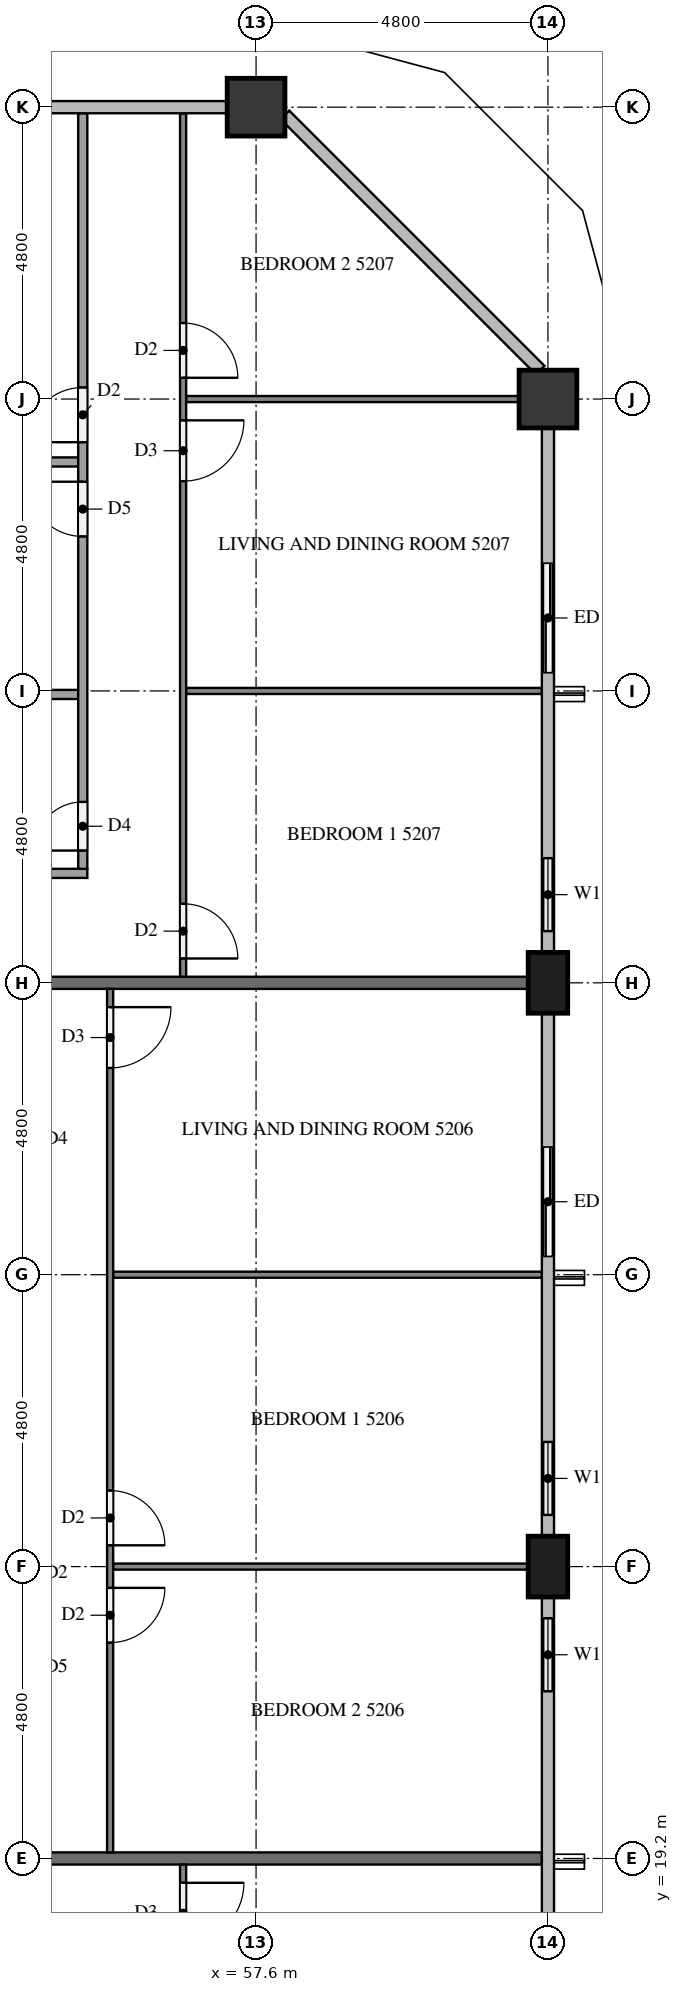
"""IFC4 building model, lengths in metres.
Left out: names, types, materials, properties, quantities, classifications, styles, units other than length and angle.
Written with IfcOpenShell. Run it as: python <this file> out.ifc"""

import sys

from ifc_helpers import new_model, si_unit, direction, frame, frame_2d, origin, origin_2d, place, context, subcontext, project, spatial, rectangle, extrude, element, fill, save


model = new_model("IFC4")
c1 = context("Model", 3, precision=1e-05, world=origin(), true_north=direction((0.0, 1.0)))
c2 = subcontext(c1, "Body", "Model", "MODEL_VIEW")
j1 = project(units=[si_unit("LENGTHUNIT", "METRE"), si_unit("PLANEANGLEUNIT", "RADIAN")], contexts=[c1])
p1 = place(None, origin())
s1 = spatial("IfcSite", under=j1, at=p1, CompositionType="ELEMENT")
p2 = place(p1, origin())
s2 = spatial("IfcBuilding", under=s1, at=p2, CompositionType="ELEMENT")
p3 = place(p2, frame((0.0, 0.0, 199.9)))
s3 = spatial("IfcBuildingStorey", under=s2, at=p3, CompositionType="ELEMENT", Elevation=199.9)
for number, where, z_axis, x_axis in (
    (1, (62.4, 24.0, 0.0), (0.0, 0.0, 1.0), (0.0, 1.0, 0.0)),
    (2, (62.4, 33.6, 0.0), (0.0, 0.0, 1.0), (0.0, 1.0, 0.0)),
):
    element("IfcColumn", number, at=place(p3, frame(where, z_axis=z_axis, x_axis=x_axis)), inside=s3, PredefinedType="COLUMN", context=c2, shape_type="SweptSolid", body=[
        extrude(rectangle(XDim=1.0, YDim=0.65, at=origin_2d()), origin(), (0.0, 0.0, 1.0), 3.1),
    ])
for number, where, z_axis, x_axis in (
    (3, (62.4, 43.2, 0.0), (0.0, 0.0, 1.0), (1.0, 0.0, 0.0)),
    (4, (57.6, 48.0, 0.0), (0.0, 0.0, 1.0), (1.0, 0.0, 0.0)),
):
    element("IfcColumn", number, at=place(p3, frame(where, z_axis=z_axis, x_axis=x_axis)), inside=s3, PredefinedType="COLUMN", context=c2, shape_type="SweptSolid", body=[
        extrude(rectangle(XDim=0.95, YDim=0.95, at=origin_2d()), origin(), (0.0, 0.0, 1.0), 3.1),
    ])
p4 = place(p3, frame((62.4, 21.6, 0.0), z_axis=(0.0, 0.0, 1.0), x_axis=(0.0, 1.0, 0.0)))
e5 = element("IfcWall", 5, at=p4, inside=s3, PredefinedType="SOLIDWALL", context=c2, shape_type="SweptSolid", body=[
    extrude(rectangle(XDim=1.9, YDim=0.15, at=frame_2d((0.95, 0.0))), origin(), (0.0, 0.0, 1.0), 3.1),
])
p5 = place(p4, frame((0.35, 0.0, 0.9)))
e6 = element("IfcOpeningElement", 6, at=p5, cuts=e5, PredefinedType="OPENING", context=c2, shape_type="SweptSolid", body=[
    extrude(rectangle(XDim=1.2, YDim=1.4, at=frame_2d((0.6, 0.7))), frame((0.0, 0.085, 0.0), z_axis=(0.0, -1.0, 0.0), x_axis=(1.0, 0.0, 0.0)), (0.0, 0.0, 1.0), 0.17),
])
p6 = place(p3, frame((62.4, 24.5, 0.0), z_axis=(0.0, 0.0, 1.0), x_axis=(0.0, 1.0, 0.0)))
e7 = element("IfcWall", 7, at=p6, inside=s3, PredefinedType="SOLIDWALL", context=c2, shape_type="SweptSolid", body=[
    extrude(rectangle(XDim=1.9, YDim=0.15, at=frame_2d((0.95, 0.0))), origin(), (0.0, 0.0, 1.0), 3.1),
])
p7 = place(p6, frame((0.35, 0.0, 0.9)))
e8 = element("IfcOpeningElement", 8, at=p7, cuts=e7, PredefinedType="OPENING", context=c2, shape_type="SweptSolid", body=[
    extrude(rectangle(XDim=1.2, YDim=1.4, at=frame_2d((0.6, 0.7))), frame((0.0, 0.085, 0.0), z_axis=(0.0, -1.0, 0.0), x_axis=(1.0, 0.0, 0.0)), (0.0, 0.0, 1.0), 0.17),
])
p8 = place(p3, frame((62.4, 28.8, 0.0), z_axis=(0.0, 0.0, 1.0), x_axis=(0.0, 1.0, 0.0)))
e9 = element("IfcWall", 9, at=p8, inside=s3, PredefinedType="SOLIDWALL", context=c2, shape_type="SweptSolid", body=[
    extrude(rectangle(XDim=2.4, YDim=0.15, at=frame_2d((1.2, 0.0))), origin(), (0.0, 0.0, 1.0), 3.1),
])
p9 = place(p8, frame((0.3, 0.0, 0.0)))
e10 = element("IfcOpeningElement", 10, at=p9, cuts=e9, PredefinedType="OPENING", context=c2, shape_type="SweptSolid", body=[
    extrude(rectangle(XDim=1.8, YDim=2.4, at=frame_2d((0.9, 1.2))), frame((0.0, 0.085, 0.0), z_axis=(0.0, -1.0, 0.0), x_axis=(1.0, 0.0, 0.0)), (0.0, 0.0, 1.0), 0.17),
])
p10 = place(p3, frame((62.4, 34.1, 0.0), z_axis=(0.0, 0.0, 1.0), x_axis=(0.0, 1.0, 0.0)))
e11 = element("IfcWall", 11, at=p10, inside=s3, PredefinedType="SOLIDWALL", context=c2, shape_type="SweptSolid", body=[
    extrude(rectangle(XDim=1.9, YDim=0.15, at=frame_2d((0.95, 0.0))), origin(), (0.0, 0.0, 1.0), 3.1),
])
p11 = place(p10, frame((0.35, 0.0, 0.9)))
e12 = element("IfcOpeningElement", 12, at=p11, cuts=e11, PredefinedType="OPENING", context=c2, shape_type="SweptSolid", body=[
    extrude(rectangle(XDim=1.2, YDim=1.4, at=frame_2d((0.6, 0.7))), frame((0.0, 0.085, 0.0), z_axis=(0.0, -1.0, 0.0), x_axis=(1.0, 0.0, 0.0)), (0.0, 0.0, 1.0), 0.17),
])
p12 = place(p3, frame((62.4, 38.4, 0.0), z_axis=(0.0, 0.0, 1.0), x_axis=(0.0, 1.0, 0.0)))
e13 = element("IfcWall", 13, at=p12, inside=s3, PredefinedType="SOLIDWALL", context=c2, shape_type="SweptSolid", body=[
    extrude(rectangle(XDim=2.4, YDim=0.15, at=frame_2d((1.2, 0.0))), origin(), (0.0, 0.0, 1.0), 3.1),
])
p13 = place(p12, frame((0.3, 0.0, 0.0)))
e14 = element("IfcOpeningElement", 14, at=p13, cuts=e13, PredefinedType="OPENING", context=c2, shape_type="SweptSolid", body=[
    extrude(rectangle(XDim=1.8, YDim=2.4, at=frame_2d((0.9, 1.2))), frame((0.0, 0.085, 0.0), z_axis=(0.0, -1.0, 0.0), x_axis=(1.0, 0.0, 0.0)), (0.0, 0.0, 1.0), 0.17),
])
p14 = place(p3, frame((50.5, 19.2, 0.0), z_axis=(0.0, 0.0, 1.0), x_axis=(1.0, 0.0, 0.0)))
e15 = element("IfcWall", 15, at=p14, inside=s3, PredefinedType="PARTITIONING", context=c2, shape_type="SweptSolid", body=[
    extrude(rectangle(XDim=11.8, YDim=0.2, at=frame_2d((5.9, 0.0))), origin(), (0.0, 0.0, 1.0), 3.1),
])
p15 = place(p3, frame((50.5, 33.6, 0.0), z_axis=(0.0, 0.0, 1.0), x_axis=(1.0, 0.0, 0.0)))
e16 = element("IfcWall", 16, at=p15, inside=s3, PredefinedType="PARTITIONING", context=c2, shape_type="SweptSolid", body=[
    extrude(rectangle(XDim=11.575, YDim=0.2, at=frame_2d((5.788, 0.0))), origin(), (0.0, 0.0, 1.0), 3.1),
])
p16 = place(p3, frame((56.4, 19.1, 0.0), z_axis=(0.0, 0.0, 1.0), x_axis=(0.0, -1.0, 0.0)))
e17 = element("IfcWall", 17, at=p16, inside=s3, PredefinedType="PARTITIONING", context=c2, shape_type="SweptSolid", body=[
    extrude(rectangle(XDim=19.0, YDim=0.1, at=frame_2d((9.5, 0.0))), origin(), (0.0, 0.0, 1.0), 3.1),
])
p17 = place(p16, frame((0.3, 0.0, 0.0)))
e18 = element("IfcOpeningElement", 18, at=p17, cuts=e17, PredefinedType="OPENING", context=c2, shape_type="SweptSolid", body=[
    extrude(rectangle(XDim=1.0, YDim=2.1, at=frame_2d((0.5, 1.05))), frame((0.0, 0.06, 0.0), z_axis=(0.0, -1.0, 0.0), x_axis=(1.0, 0.0, 0.0)), (0.0, 0.0, 1.0), 0.12),
])
p18 = place(p16, frame((8.25, 0.0, 0.0)))
e19 = element("IfcOpeningElement", 19, at=p18, cuts=e17, PredefinedType="OPENING", context=c2, shape_type="SweptSolid", body=[
    extrude(rectangle(XDim=0.9, YDim=2.1, at=frame_2d((0.45, 1.05))), frame((0.0, 0.06, 0.0), z_axis=(0.0, -1.0, 0.0), x_axis=(1.0, 0.0, 0.0)), (0.0, 0.0, 1.0), 0.12),
])
p19 = place(p16, frame((9.85, 0.0, 0.0)))
e20 = element("IfcOpeningElement", 20, at=p19, cuts=e17, PredefinedType="OPENING", context=c2, shape_type="SweptSolid", body=[
    extrude(rectangle(XDim=0.9, YDim=2.1, at=frame_2d((0.45, 1.05))), frame((0.0, 0.06, 0.0), z_axis=(0.0, -1.0, 0.0), x_axis=(1.0, 0.0, 0.0)), (0.0, 0.0, 1.0), 0.12),
])
p20 = place(p16, frame((17.7, 0.0, 0.0)))
e21 = element("IfcOpeningElement", 21, at=p20, cuts=e17, PredefinedType="OPENING", context=c2, shape_type="SweptSolid", body=[
    extrude(rectangle(XDim=0.9, YDim=2.1, at=frame_2d((0.45, 1.05))), frame((0.0, 0.06, 0.0), z_axis=(0.0, -1.0, 0.0), x_axis=(1.0, 0.0, 0.0)), (0.0, 0.0, 1.0), 0.12),
])
p21 = place(p3, frame((55.25, 28.8, 0.0), z_axis=(0.0, 0.0, 1.0), x_axis=(1.0, 0.0, 0.0)))
e22 = element("IfcWall", 22, at=p21, inside=s3, PredefinedType="PARTITIONING", context=c2, shape_type="SweptSolid", body=[
    extrude(rectangle(XDim=7.05, YDim=0.1, at=frame_2d((3.525, 0.0))), origin(), (0.0, 0.0, 1.0), 3.1),
])
p22 = place(p3, frame((55.25, 24.0, 0.0), z_axis=(0.0, 0.0, 1.0), x_axis=(1.0, 0.0, 0.0)))
e23 = element("IfcWall", 23, at=p22, inside=s3, PredefinedType="PARTITIONING", context=c2, shape_type="SweptSolid", body=[
    extrude(rectangle(XDim=6.825, YDim=0.1, at=frame_2d((3.413, 0.0))), origin(), (0.0, 0.0, 1.0), 3.1),
])
p23 = place(p3, frame((55.2, 33.5, 0.0), z_axis=(0.0, 0.0, 1.0), x_axis=(0.0, -1.0, 0.0)))
e24 = element("IfcWall", 24, at=p23, inside=s3, PredefinedType="PARTITIONING", context=c2, shape_type="SweptSolid", body=[
    extrude(rectangle(XDim=14.2, YDim=0.1, at=frame_2d((7.1, 0.0))), origin(), (0.0, 0.0, 1.0), 3.1),
])
p24 = place(p23, frame((0.3, 0.0, 0.0)))
e25 = element("IfcOpeningElement", 25, at=p24, cuts=e24, PredefinedType="OPENING", context=c2, shape_type="SweptSolid", body=[
    extrude(rectangle(XDim=1.0, YDim=2.1, at=frame_2d((0.5, 1.05))), frame((0.0, 0.06, 0.0), z_axis=(0.0, -1.0, 0.0), x_axis=(1.0, 0.0, 0.0)), (0.0, 0.0, 1.0), 0.12),
])
p25 = place(p23, frame((8.25, 0.0, 0.0)))
e26 = element("IfcOpeningElement", 26, at=p25, cuts=e24, PredefinedType="OPENING", context=c2, shape_type="SweptSolid", body=[
    extrude(rectangle(XDim=0.9, YDim=2.1, at=frame_2d((0.45, 1.05))), frame((0.0, 0.06, 0.0), z_axis=(0.0, -1.0, 0.0), x_axis=(1.0, 0.0, 0.0)), (0.0, 0.0, 1.0), 0.12),
])
p26 = place(p23, frame((9.85, 0.0, 0.0)))
e27 = element("IfcOpeningElement", 27, at=p26, cuts=e24, PredefinedType="OPENING", context=c2, shape_type="SweptSolid", body=[
    extrude(rectangle(XDim=0.9, YDim=2.1, at=frame_2d((0.45, 1.05))), frame((0.0, 0.06, 0.0), z_axis=(0.0, -1.0, 0.0), x_axis=(1.0, 0.0, 0.0)), (0.0, 0.0, 1.0), 0.12),
])
p27 = place(p3, frame((56.45, 38.4, 0.0), z_axis=(0.0, 0.0, 1.0), x_axis=(1.0, 0.0, 0.0)))
e28 = element("IfcWall", 28, at=p27, inside=s3, PredefinedType="PARTITIONING", context=c2, shape_type="SweptSolid", body=[
    extrude(rectangle(XDim=5.85, YDim=0.1, at=frame_2d((2.925, 0.0))), origin(), (0.0, 0.0, 1.0), 3.1),
])
p28 = place(p3, frame((56.45, 43.2, 0.0), z_axis=(0.0, 0.0, 1.0), x_axis=(1.0, 0.0, 0.0)))
e29 = element("IfcWall", 29, at=p28, inside=s3, PredefinedType="PARTITIONING", context=c2, shape_type="SweptSolid", body=[
    extrude(rectangle(XDim=5.475, YDim=0.1, at=frame_2d((2.738, 0.0))), origin(), (0.0, 0.0, 1.0), 3.1),
])
p29 = place(p3, frame((56.4, 47.9, 0.0), z_axis=(0.0, 0.0, 1.0), x_axis=(0.0, -1.0, 0.0)))
e30 = element("IfcWall", 30, at=p29, inside=s3, PredefinedType="PARTITIONING", context=c2, shape_type="SweptSolid", body=[
    extrude(rectangle(XDim=14.2, YDim=0.1, at=frame_2d((7.1, 0.0))), origin(), (0.0, 0.0, 1.0), 3.1),
])
p30 = place(p29, frame((13.0, 0.0, 0.0)))
e31 = element("IfcOpeningElement", 31, at=p30, cuts=e30, PredefinedType="OPENING", context=c2, shape_type="SweptSolid", body=[
    extrude(rectangle(XDim=0.9, YDim=2.1, at=frame_2d((0.45, 1.05))), frame((0.0, 0.06, 0.0), z_axis=(0.0, -1.0, 0.0), x_axis=(1.0, 0.0, 0.0)), (0.0, 0.0, 1.0), 0.12),
])
p31 = place(p29, frame((5.05, 0.0, 0.0)))
e32 = element("IfcOpeningElement", 32, at=p31, cuts=e30, PredefinedType="OPENING", context=c2, shape_type="SweptSolid", body=[
    extrude(rectangle(XDim=1.0, YDim=2.1, at=frame_2d((0.5, 1.05))), frame((0.0, 0.06, 0.0), z_axis=(0.0, -1.0, 0.0), x_axis=(1.0, 0.0, 0.0)), (0.0, 0.0, 1.0), 0.12),
])
p32 = place(p29, frame((3.45, 0.0, 0.0)))
e33 = element("IfcOpeningElement", 33, at=p32, cuts=e30, PredefinedType="OPENING", context=c2, shape_type="SweptSolid", body=[
    extrude(rectangle(XDim=0.9, YDim=2.1, at=frame_2d((0.45, 1.05))), frame((0.0, 0.06, 0.0), z_axis=(0.0, -1.0, 0.0), x_axis=(1.0, 0.0, 0.0)), (0.0, 0.0, 1.0), 0.12),
])
for number, where, z_axis, x_axis in (
    (34, (50.5, 38.342, 0.0), (0.0, 0.0, 1.0), (1.0, 0.0, 0.0)),
    (35, (50.5, 42.165, 0.0), (0.0, 0.0, 1.0), (1.0, 0.0, 0.0)),
):
    element("IfcWall", number, at=place(p3, frame(where, z_axis=z_axis, x_axis=x_axis)), inside=s3, PredefinedType="PARTITIONING", context=c2, shape_type="SweptSolid", body=[
        extrude(rectangle(XDim=4.175, YDim=0.15, at=frame_2d((2.087, 0.0))), origin(), (0.0, 0.0, 1.0), 3.1),
    ])
p33 = place(p3, frame((50.5, 35.4, 0.0), z_axis=(0.0, 0.0, 1.0), x_axis=(1.0, 0.0, 0.0)))
e36 = element("IfcWall", 36, at=p33, inside=s3, PredefinedType="PARTITIONING", context=c2, shape_type="SweptSolid", body=[
    extrude(rectangle(XDim=4.325, YDim=0.15, at=frame_2d((2.163, 0.0))), origin(), (0.0, 0.0, 1.0), 3.1),
])
p34 = place(p3, frame((54.75, 35.475, 0.0), z_axis=(0.0, 0.0, 1.0), x_axis=(0.0, 1.0, 0.0)))
e37 = element("IfcWall", 37, at=p34, inside=s3, PredefinedType="PARTITIONING", context=c2, shape_type="SweptSolid", body=[
    extrude(rectangle(XDim=12.425, YDim=0.15, at=frame_2d((6.212, 0.0))), origin(), (0.0, 0.0, 1.0), 3.1),
])
p35 = place(p34, frame((0.3, 0.0, 0.0)))
e38 = element("IfcOpeningElement", 38, at=p35, cuts=e37, PredefinedType="OPENING", context=c2, shape_type="SweptSolid", body=[
    extrude(rectangle(XDim=0.8, YDim=2.1, at=frame_2d((0.4, 1.05))), frame((0.0, 0.085, 0.0), z_axis=(0.0, -1.0, 0.0), x_axis=(1.0, 0.0, 0.0)), (0.0, 0.0, 1.0), 0.17),
])
p36 = place(p34, frame((5.465, 0.0, 0.0)))
e39 = element("IfcOpeningElement", 39, at=p36, cuts=e37, PredefinedType="OPENING", context=c2, shape_type="SweptSolid", body=[
    extrude(rectangle(XDim=0.9, YDim=2.1, at=frame_2d((0.45, 1.05))), frame((0.0, 0.085, 0.0), z_axis=(0.0, -1.0, 0.0), x_axis=(1.0, 0.0, 0.0)), (0.0, 0.0, 1.0), 0.17),
])
p37 = place(p34, frame((7.015, 0.0, 0.0)))
e40 = element("IfcOpeningElement", 40, at=p37, cuts=e37, PredefinedType="OPENING", context=c2, shape_type="SweptSolid", body=[
    extrude(rectangle(XDim=0.9, YDim=2.1, at=frame_2d((0.45, 1.05))), frame((0.0, 0.085, 0.0), z_axis=(0.0, -1.0, 0.0), x_axis=(1.0, 0.0, 0.0)), (0.0, 0.0, 1.0), 0.17),
])
p38 = place(p5, origin())
e41 = element("IfcWindow", 41, at=p38, inside=s3, PartitioningType="SINGLE_PANEL", PredefinedType="WINDOW", context=c2, shape_type="SweptSolid", body=[
    extrude(rectangle(XDim=1.2, YDim=1.4, at=frame_2d((0.6, 0.7))), frame((0.0, 0.03, 0.0), z_axis=(0.0, -1.0, 0.0), x_axis=(1.0, 0.0, 0.0)), (0.0, 0.0, 1.0), 0.06),
])
fill(e6, e41)
p39 = place(p7, origin())
e42 = element("IfcWindow", 42, at=p39, inside=s3, PartitioningType="SINGLE_PANEL", PredefinedType="WINDOW", context=c2, shape_type="SweptSolid", body=[
    extrude(rectangle(XDim=1.2, YDim=1.4, at=frame_2d((0.6, 0.7))), frame((0.0, 0.03, 0.0), z_axis=(0.0, -1.0, 0.0), x_axis=(1.0, 0.0, 0.0)), (0.0, 0.0, 1.0), 0.06),
])
fill(e8, e42)
p40 = place(p9, origin())
e43 = element("IfcDoor", 43, at=p40, inside=s3, OperationType="SLIDING_TO_RIGHT", PredefinedType="DOOR", context=c2, shape_type="SweptSolid", body=[
    extrude(rectangle(XDim=1.8, YDim=2.4, at=frame_2d((0.9, 1.2))), frame((0.0, 0.025, 0.0), z_axis=(0.0, -1.0, 0.0), x_axis=(1.0, 0.0, 0.0)), (0.0, 0.0, 1.0), 0.05),
])
fill(e10, e43)
p41 = place(p11, origin())
e44 = element("IfcWindow", 44, at=p41, inside=s3, PartitioningType="SINGLE_PANEL", PredefinedType="WINDOW", context=c2, shape_type="SweptSolid", body=[
    extrude(rectangle(XDim=1.2, YDim=1.4, at=frame_2d((0.6, 0.7))), frame((0.0, 0.03, 0.0), z_axis=(0.0, -1.0, 0.0), x_axis=(1.0, 0.0, 0.0)), (0.0, 0.0, 1.0), 0.06),
])
fill(e12, e44)
p42 = place(p13, origin())
e45 = element("IfcDoor", 45, at=p42, inside=s3, OperationType="SLIDING_TO_LEFT", PredefinedType="DOOR", context=c2, shape_type="SweptSolid", body=[
    extrude(rectangle(XDim=1.8, YDim=2.4, at=frame_2d((0.9, 1.2))), frame((0.0, 0.025, 0.0), z_axis=(0.0, -1.0, 0.0), x_axis=(1.0, 0.0, 0.0)), (0.0, 0.0, 1.0), 0.05),
])
fill(e14, e45)
p43 = place(p17, origin())
e46 = element("IfcDoor", 46, at=p43, inside=s3, OperationType="SINGLE_SWING_LEFT", PredefinedType="DOOR", context=c2, shape_type="SweptSolid", body=[
    extrude(rectangle(XDim=1.0, YDim=2.1, at=frame_2d((0.5, 1.05))), frame((0.0, 0.025, 0.0), z_axis=(0.0, -1.0, 0.0), x_axis=(1.0, 0.0, 0.0)), (0.0, 0.0, 1.0), 0.05),
])
fill(e18, e46)
p44 = place(p24, origin())
e47 = element("IfcDoor", 47, at=p44, inside=s3, OperationType="SINGLE_SWING_LEFT", PredefinedType="DOOR", context=c2, shape_type="SweptSolid", body=[
    extrude(rectangle(XDim=1.0, YDim=2.1, at=frame_2d((0.5, 1.05))), frame((0.0, 0.025, 0.0), z_axis=(0.0, -1.0, 0.0), x_axis=(1.0, 0.0, 0.0)), (0.0, 0.0, 1.0), 0.05),
])
fill(e25, e47)
p45 = place(p25, origin())
e48 = element("IfcDoor", 48, at=p45, inside=s3, OperationType="SINGLE_SWING_RIGHT", PredefinedType="DOOR", context=c2, shape_type="SweptSolid", body=[
    extrude(rectangle(XDim=0.9, YDim=2.1, at=frame_2d((0.45, 1.05))), frame((0.0, 0.025, 0.0), z_axis=(0.0, -1.0, 0.0), x_axis=(1.0, 0.0, 0.0)), (0.0, 0.0, 1.0), 0.05),
])
fill(e26, e48)
p46 = place(p26, origin())
e49 = element("IfcDoor", 49, at=p46, inside=s3, OperationType="SINGLE_SWING_LEFT", PredefinedType="DOOR", context=c2, shape_type="SweptSolid", body=[
    extrude(rectangle(XDim=0.9, YDim=2.1, at=frame_2d((0.45, 1.05))), frame((0.0, 0.025, 0.0), z_axis=(0.0, -1.0, 0.0), x_axis=(1.0, 0.0, 0.0)), (0.0, 0.0, 1.0), 0.05),
])
fill(e27, e49)
p47 = place(p30, origin())
e50 = element("IfcDoor", 50, at=p47, inside=s3, OperationType="SINGLE_SWING_RIGHT", PredefinedType="DOOR", context=c2, shape_type="SweptSolid", body=[
    extrude(rectangle(XDim=0.9, YDim=2.1, at=frame_2d((0.45, 1.05))), frame((0.0, 0.025, 0.0), z_axis=(0.0, -1.0, 0.0), x_axis=(1.0, 0.0, 0.0)), (0.0, 0.0, 1.0), 0.05),
])
fill(e31, e50)
p48 = place(p31, origin())
e51 = element("IfcDoor", 51, at=p48, inside=s3, OperationType="SINGLE_SWING_LEFT", PredefinedType="DOOR", context=c2, shape_type="SweptSolid", body=[
    extrude(rectangle(XDim=1.0, YDim=2.1, at=frame_2d((0.5, 1.05))), frame((0.0, 0.025, 0.0), z_axis=(0.0, -1.0, 0.0), x_axis=(1.0, 0.0, 0.0)), (0.0, 0.0, 1.0), 0.05),
])
fill(e32, e51)
p49 = place(p32, origin())
e52 = element("IfcDoor", 52, at=p49, inside=s3, OperationType="SINGLE_SWING_RIGHT", PredefinedType="DOOR", context=c2, shape_type="SweptSolid", body=[
    extrude(rectangle(XDim=0.9, YDim=2.1, at=frame_2d((0.45, 1.05))), frame((0.0, 0.025, 0.0), z_axis=(0.0, -1.0, 0.0), x_axis=(1.0, 0.0, 0.0)), (0.0, 0.0, 1.0), 0.05),
])
fill(e33, e52)
p50 = place(p35, origin())
e53 = element("IfcDoor", 53, at=p50, inside=s3, OperationType="SINGLE_SWING_LEFT", PredefinedType="DOOR", context=c2, shape_type="SweptSolid", body=[
    extrude(rectangle(XDim=0.8, YDim=2.1, at=frame_2d((0.4, 1.05))), frame((0.0, 0.025, 0.0), z_axis=(0.0, -1.0, 0.0), x_axis=(1.0, 0.0, 0.0)), (0.0, 0.0, 1.0), 0.05),
])
fill(e38, e53)
p51 = place(p36, origin())
e54 = element("IfcDoor", 54, at=p51, inside=s3, OperationType="SINGLE_SWING_RIGHT", PredefinedType="DOOR", context=c2, shape_type="SweptSolid", body=[
    extrude(rectangle(XDim=0.9, YDim=2.1, at=frame_2d((0.45, 1.05))), frame((0.0, 0.025, 0.0), z_axis=(0.0, -1.0, 0.0), x_axis=(1.0, 0.0, 0.0)), (0.0, 0.0, 1.0), 0.05),
])
fill(e39, e54)
p52 = place(p37, origin())
e55 = element("IfcDoor", 55, at=p52, inside=s3, OperationType="SINGLE_SWING_LEFT", PredefinedType="DOOR", context=c2, shape_type="SweptSolid", body=[
    extrude(rectangle(XDim=0.9, YDim=2.1, at=frame_2d((0.45, 1.05))), frame((0.0, 0.025, 0.0), z_axis=(0.0, -1.0, 0.0), x_axis=(1.0, 0.0, 0.0)), (0.0, 0.0, 1.0), 0.05),
])
fill(e40, e55)
save(model, sys.argv[1])
